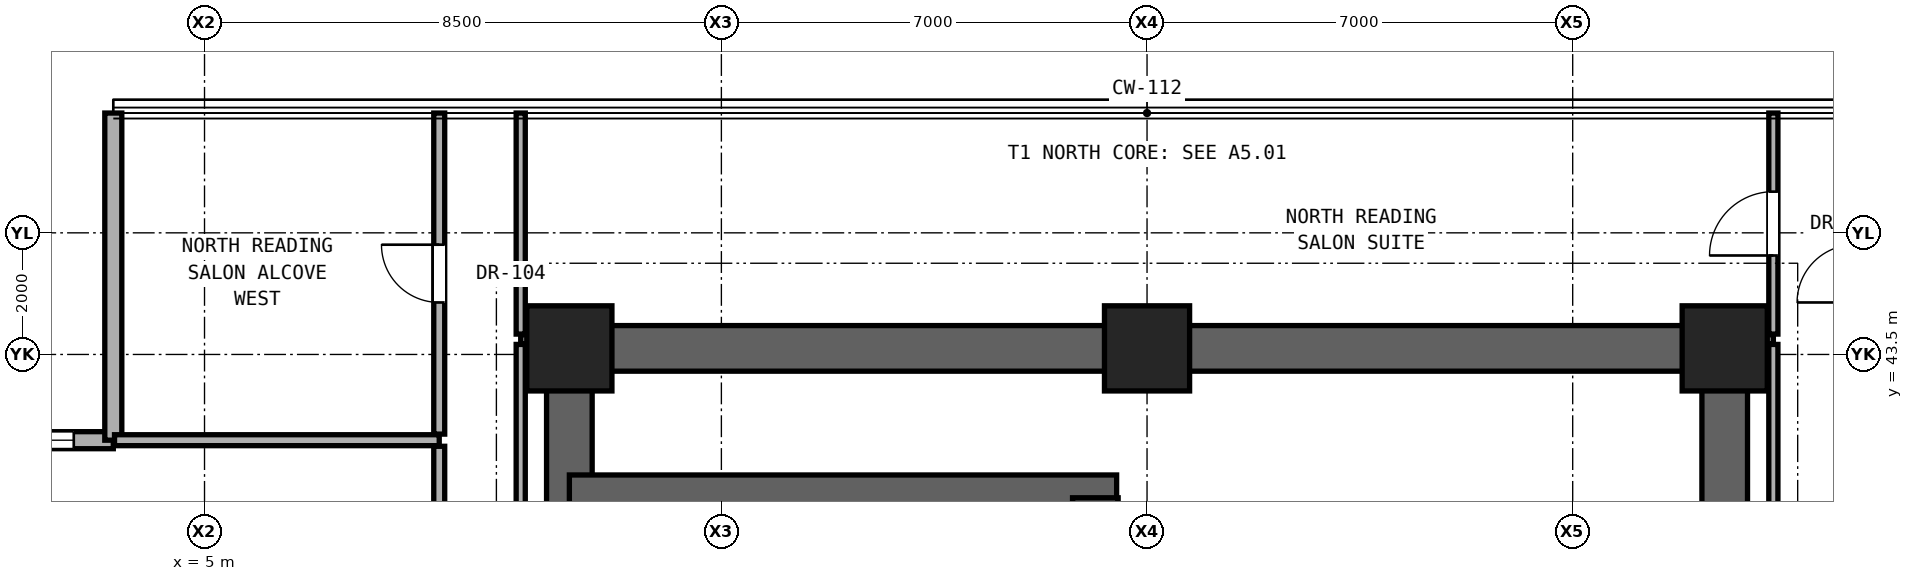
"""IFC4 building model, lengths in metres.
Left out: names, types, materials, properties, quantities, classifications, styles, units other than length and angle.
Written with IfcOpenShell. Run it as: python <this file> out.ifc"""

import sys

from ifc_helpers import new_model, si_unit, direction, frame, frame_2d, origin, origin_2d, place, context, subcontext, project, spatial, rectangle, extrude, element, fill, save


model = new_model("IFC4")
c1 = context("Model", 3, precision=1e-05, world=origin(), true_north=direction((0.0, 1.0)))
c2 = subcontext(c1, "Body", "Model", "MODEL_VIEW")
j1 = project(units=[si_unit("LENGTHUNIT", "METRE"), si_unit("PLANEANGLEUNIT", "RADIAN")], contexts=[c1])
p1 = place(None, origin())
s1 = spatial("IfcSite", under=j1, at=p1, CompositionType="ELEMENT")
p2 = place(p1, origin())
s2 = spatial("IfcBuilding", under=s1, at=p2, CompositionType="ELEMENT")
p3 = place(p2, frame((0.0, 0.0, 38.9)))
s3 = spatial("IfcBuildingStorey", under=s2, at=p3, CompositionType="ELEMENT", Elevation=38.9)
for number, where, z_axis, x_axis in (
    (1, (11.0, 43.6, 0.0), (0.0, 0.0, 1.0), (1.0, 0.0, 0.0)),
    (2, (20.5, 43.6, 0.0), (0.0, 0.0, 1.0), (1.0, 0.0, 0.0)),
    (3, (30.0, 43.6, 0.0), (0.0, 0.0, 1.0), (1.0, 0.0, 0.0)),
):
    element("IfcColumn", number, at=place(p3, frame(where, z_axis=z_axis, x_axis=x_axis)), inside=s3, PredefinedType="COLUMN", context=c2, shape_type="SweptSolid", body=[
        extrude(rectangle(XDim=1.4, YDim=1.4, at=origin_2d()), origin(), (0.0, 0.0, 1.0), 3.3),
    ])
p4 = place(p3, frame((11.0, 43.6, 0.0), z_axis=(0.0, 0.0, 1.0), x_axis=(1.0, 0.0, 0.0)))
e4 = element("IfcWall", 4, at=p4, inside=s3, PredefinedType="SHEAR", context=c2, shape_type="SweptSolid", body=[
    extrude(rectangle(XDim=19.0, YDim=0.75, at=frame_2d((9.5, 0.0))), origin(), (0.0, 0.0, 1.0), 3.06),
])
for number, where, z_axis, x_axis in (
    (5, (11.0, 37.6, 0.0), (0.0, 0.0, 1.0), (0.0, 1.0, 0.0)),
    (6, (30.0, 37.6, 0.0), (0.0, 0.0, 1.0), (0.0, 1.0, 0.0)),
):
    element("IfcWall", number, at=place(p3, frame(where, z_axis=z_axis, x_axis=x_axis)), inside=s3, PredefinedType="SHEAR", context=c2, shape_type="SweptSolid", body=[
        extrude(rectangle(XDim=6.0, YDim=0.75, at=frame_2d((3.0, 0.0))), origin(), (0.0, 0.0, 1.0), 3.06),
    ])
p5 = place(p3, frame((11.0, 41.143, 0.0), z_axis=(0.0, 0.0, 1.0), x_axis=(1.0, 0.0, 0.0)))
e7 = element("IfcWall", 7, at=p5, inside=s3, PredefinedType="SHEAR", context=c2, shape_type="SweptSolid", body=[
    extrude(rectangle(XDim=9.0, YDim=0.75, at=frame_2d((4.5, 0.0))), origin(), (0.0, 0.0, 1.0), 3.06),
])
p6 = place(p3, frame((19.65, 37.6, 0.0), z_axis=(0.0, 0.0, 1.0), x_axis=(0.0, 1.0, 0.0)))
e8 = element("IfcWall", 8, at=p6, inside=s3, PredefinedType="SHEAR", context=c2, shape_type="SweptSolid", body=[
    extrude(rectangle(XDim=3.543, YDim=0.75, at=frame_2d((1.771, 0.0))), origin(), (0.0, 0.0, 1.0), 3.06),
])
p7 = place(p3, frame((3.5, 42.09, 0.0), z_axis=(0.0, 0.0, 1.0), x_axis=(-1.0, 0.0, 0.0)))
e9 = element("IfcWall", 9, at=p7, inside=s3, PredefinedType="SOLIDWALL", context=c2, shape_type="SweptSolid", body=[
    extrude(rectangle(XDim=5.38, YDim=0.28, at=frame_2d((2.69, 0.0))), origin(), (0.0, 0.0, 1.0), 3.04),
])
p8 = place(p7, frame((0.65, 0.0, 0.85)))
e10 = element("IfcOpeningElement", 10, at=p8, cuts=e9, PredefinedType="OPENING", context=c2, shape_type="SweptSolid", body=[
    extrude(rectangle(XDim=1.1, YDim=2.0, at=frame_2d((0.55, 1.0))), frame((0.0, 0.15, 0.0), z_axis=(0.0, -1.0, 0.0), x_axis=(1.0, 0.0, 0.0)), (0.0, 0.0, 1.0), 0.3),
])
p9 = place(p3, frame((3.5, 47.47, 0.0), z_axis=(0.0, 0.0, 1.0), x_axis=(0.0, -1.0, 0.0)))
e11 = element("IfcWall", 11, at=p9, inside=s3, PredefinedType="SOLIDWALL", context=c2, shape_type="SweptSolid", body=[
    extrude(rectangle(XDim=5.38, YDim=0.28, at=frame_2d((2.69, 0.0))), origin(), (0.0, 0.0, 1.0), 3.04),
])
p10 = place(p3, frame((3.52, 42.09, 0.0), z_axis=(0.0, 0.0, 1.0), x_axis=(1.0, 0.0, 0.0)))
e12 = element("IfcWall", 12, at=p10, inside=s3, PredefinedType="PARTITIONING", context=c2, shape_type="SweptSolid", body=[
    extrude(rectangle(XDim=5.34, YDim=0.18, at=frame_2d((2.67, 0.0))), origin(), (0.0, 0.0, 1.0), 3.06),
])
for number, where, z_axis, x_axis in (
    (13, (10.2, 43.75, 0.0), (0.0, 0.0, 1.0), (1.0, 0.0, 0.0)),
    (14, (30.37, 43.75, 0.0), (0.0, 0.0, 1.0), (1.0, 0.0, 0.0)),
):
    element("IfcWall", number, at=place(p3, frame(where, z_axis=z_axis, x_axis=x_axis)), inside=s3, PredefinedType="PARTITIONING", context=c2, shape_type="SweptSolid", body=[
        extrude(rectangle(XDim=0.43, YDim=0.15, at=frame_2d((0.215, 0.0))), origin(), (0.0, 0.0, 1.0), 3.06),
    ])
p11 = place(p3, frame((8.86, 33.6, 0.0), z_axis=(0.0, 0.0, 1.0), x_axis=(0.0, 1.0, 0.0)))
e15 = element("IfcWall", 15, at=p11, inside=s3, PredefinedType="PARTITIONING", context=c2, shape_type="SweptSolid", body=[
    extrude(rectangle(XDim=8.39, YDim=0.18, at=frame_2d((4.195, 0.0))), origin(), (0.0, 0.0, 1.0), 2.436),
])
p12 = place(p11, frame((3.67, 0.0, 0.0)))
e16 = element("IfcOpeningElement", 16, at=p12, cuts=e15, PredefinedType="OPENING", context=c2, shape_type="SweptSolid", body=[
    extrude(rectangle(XDim=1.05, YDim=2.2, at=frame_2d((0.525, 1.1))), frame((0.0, 0.1, 0.0), z_axis=(0.0, -1.0, 0.0), x_axis=(1.0, 0.0, 0.0)), (0.0, 0.0, 1.0), 0.2),
])
p13 = place(p3, frame((8.86, 42.19, 0.0), z_axis=(0.0, 0.0, 1.0), x_axis=(0.0, 1.0, 0.0)))
e17 = element("IfcWall", 17, at=p13, inside=s3, PredefinedType="PARTITIONING", context=c2, shape_type="SweptSolid", body=[
    extrude(rectangle(XDim=5.28, YDim=0.18, at=frame_2d((2.64, 0.0))), origin(), (0.0, 0.0, 1.0), 3.06),
])
p14 = place(p13, frame((2.165, 0.0, 0.0)))
e18 = element("IfcOpeningElement", 18, at=p14, cuts=e17, PredefinedType="OPENING", context=c2, shape_type="SweptSolid", body=[
    extrude(rectangle(XDim=0.95, YDim=2.15, at=frame_2d((0.475, 1.075))), frame((0.0, 0.1, 0.0), z_axis=(0.0, -1.0, 0.0), x_axis=(1.0, 0.0, 0.0)), (0.0, 0.0, 1.0), 0.2),
])
p15 = place(p3, frame((10.2, 34.535, 0.0), z_axis=(0.0, 0.0, 1.0), x_axis=(0.0, 1.0, 0.0)))
e19 = element("IfcWall", 19, at=p15, inside=s3, PredefinedType="PARTITIONING", context=c2, shape_type="SweptSolid", body=[
    extrude(rectangle(XDim=9.13, YDim=0.15, at=frame_2d((4.565, 0.0))), origin(), (0.0, 0.0, 1.0), 2.436),
])
p16 = place(p3, frame((10.2, 43.835, 0.0), z_axis=(0.0, 0.0, 1.0), x_axis=(0.0, 1.0, 0.0)))
e20 = element("IfcWall", 20, at=p16, inside=s3, PredefinedType="PARTITIONING", context=c2, shape_type="SweptSolid", body=[
    extrude(rectangle(XDim=3.635, YDim=0.15, at=frame_2d((1.817, 0.0))), origin(), (0.0, 0.0, 1.0), 3.06),
])
p17 = place(p3, frame((30.8, 34.57, 0.0), z_axis=(0.0, 0.0, 1.0), x_axis=(0.0, 1.0, 0.0)))
e21 = element("IfcWall", 21, at=p17, inside=s3, PredefinedType="PARTITIONING", context=c2, shape_type="SweptSolid", body=[
    extrude(rectangle(XDim=9.095, YDim=0.15, at=frame_2d((4.547, 0.0))), origin(), (0.0, 0.0, 1.0), 2.436),
])
p18 = place(p3, frame((30.8, 43.835, 0.0), z_axis=(0.0, 0.0, 1.0), x_axis=(0.0, 1.0, 0.0)))
e22 = element("IfcWall", 22, at=p18, inside=s3, PredefinedType="PARTITIONING", context=c2, shape_type="SweptSolid", body=[
    extrude(rectangle(XDim=3.635, YDim=0.15, at=frame_2d((1.817, 0.0))), origin(), (0.0, 0.0, 1.0), 3.06),
])
p19 = place(p18, frame((1.292, 0.0, 0.0)))
e23 = element("IfcOpeningElement", 23, at=p19, cuts=e22, PredefinedType="OPENING", context=c2, shape_type="SweptSolid", body=[
    extrude(rectangle(XDim=1.05, YDim=2.2, at=frame_2d((0.525, 1.1))), frame((0.0, 0.085, 0.0), z_axis=(0.0, -1.0, 0.0), x_axis=(1.0, 0.0, 0.0)), (0.0, 0.0, 1.0), 0.17),
])
p20 = place(p8, origin())
e24 = element("IfcWindow", 24, at=p20, inside=s3, PartitioningType="SINGLE_PANEL", PredefinedType="WINDOW", context=c2, shape_type="SweptSolid", body=[
    extrude(rectangle(XDim=1.1, YDim=2.0, at=frame_2d((0.55, 1.0))), frame((0.0, 0.03, 0.0), z_axis=(0.0, -1.0, 0.0), x_axis=(1.0, 0.0, 0.0)), (0.0, 0.0, 1.0), 0.06),
])
fill(e10, e24)
p21 = place(p19, origin())
e25 = element("IfcDoor", 25, at=p21, inside=s3, OperationType="SINGLE_SWING_LEFT", PredefinedType="DOOR", context=c2, shape_type="SweptSolid", body=[
    extrude(rectangle(XDim=1.05, YDim=2.2, at=frame_2d((0.525, 1.1))), frame((0.0, 0.025, 0.0), z_axis=(0.0, -1.0, 0.0), x_axis=(1.0, 0.0, 0.0)), (0.0, 0.0, 1.0), 0.05),
])
fill(e23, e25)
p22 = place(p14, origin())
e26 = element("IfcDoor", 26, at=p22, inside=s3, OperationType="SINGLE_SWING_RIGHT", PredefinedType="DOOR", context=c2, shape_type="SweptSolid", body=[
    extrude(rectangle(XDim=0.95, YDim=2.15, at=frame_2d((0.475, 1.075))), frame((0.0, 0.025, 0.0), z_axis=(0.0, -1.0, 0.0), x_axis=(1.0, 0.0, 0.0)), (0.0, 0.0, 1.0), 0.05),
])
fill(e18, e26)
save(model, sys.argv[1])
